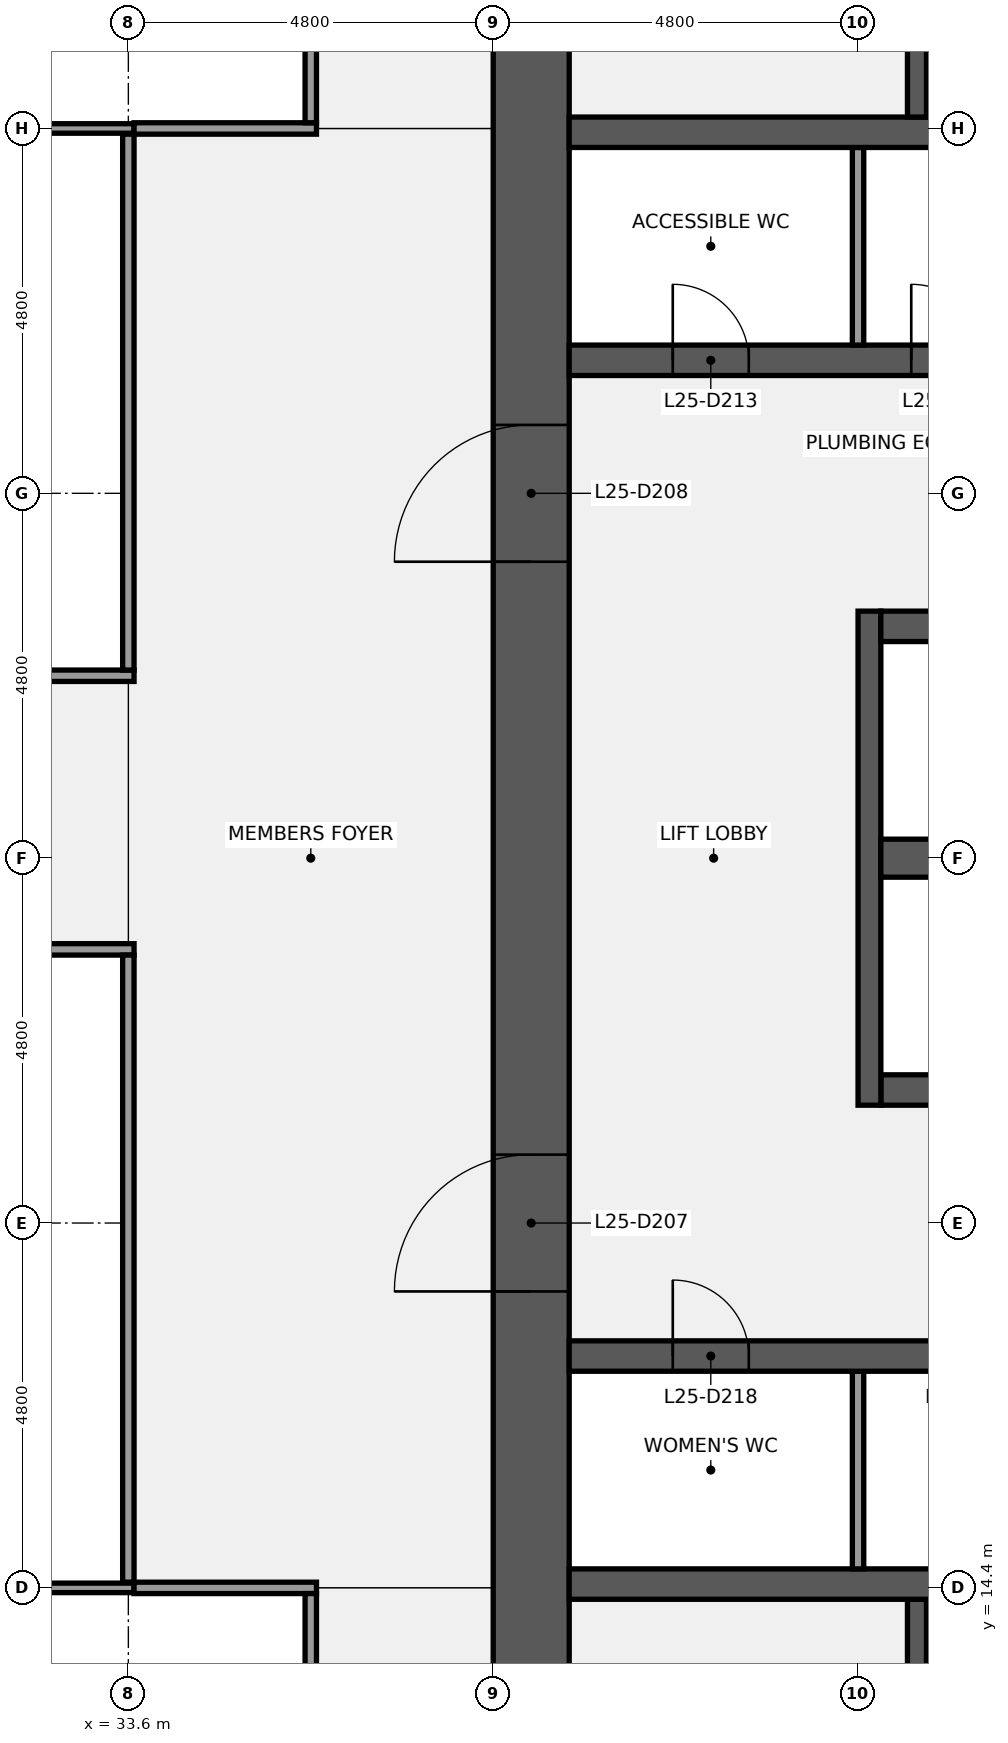
"""IFC4 building model, lengths in metres.
Left out: names, types, materials, properties, quantities, classifications, styles, units other than length and angle.
Written with IfcOpenShell. Run it as: python <this file> out.ifc"""

import sys

from ifc_helpers import new_model, si_unit, direction, frame, frame_2d, origin, place, context, subcontext, project, spatial, rectangle, extrude, element, fill, save


model = new_model("IFC4")
c1 = context("Model", 3, precision=1e-05, world=origin(), true_north=direction((0.0, 1.0)))
c2 = subcontext(c1, "Body", "Model", "MODEL_VIEW")
j1 = project(units=[si_unit("LENGTHUNIT", "METRE"), si_unit("PLANEANGLEUNIT", "RADIAN")], contexts=[c1])
p1 = place(None, origin())
s1 = spatial("IfcSite", under=j1, at=p1, CompositionType="ELEMENT")
p2 = place(p1, origin())
s2 = spatial("IfcBuilding", under=s1, at=p2, CompositionType="ELEMENT")
p3 = place(p2, frame((0.0, 0.0, 120.1)))
s3 = spatial("IfcBuildingStorey", under=s2, at=p3, CompositionType="ELEMENT", Elevation=120.1)
p4 = place(p3, frame((38.9, 9.6, 0.0), z_axis=(0.0, 0.0, 1.0), x_axis=(0.0, 1.0, 0.0)))
e1 = element("IfcWall", 1, at=p4, inside=s3, PredefinedType="SHEAR", context=c2, shape_type="SweptSolid", body=[
    extrude(rectangle(XDim=28.8, YDim=1.0, at=frame_2d((14.4, 0.0))), origin(), (0.0, 0.0, 1.0), 3.84),
])
p5 = place(p4, frame((8.7, 0.0, 0.0)))
e2 = element("IfcOpeningElement", 2, at=p5, cuts=e1, PredefinedType="OPENING", context=c2, shape_type="SweptSolid", body=[
    extrude(rectangle(XDim=1.8, YDim=2.1, at=frame_2d((0.9, 1.05))), frame((0.0, 0.51, 0.0), z_axis=(0.0, -1.0, 0.0), x_axis=(1.0, 0.0, 0.0)), (0.0, 0.0, 1.0), 1.02),
])
p6 = place(p4, frame((18.3, 0.0, 0.0)))
e3 = element("IfcOpeningElement", 3, at=p6, cuts=e1, PredefinedType="OPENING", context=c2, shape_type="SweptSolid", body=[
    extrude(rectangle(XDim=1.8, YDim=2.1, at=frame_2d((0.9, 1.05))), frame((0.0, 0.51, 0.0), z_axis=(0.0, -1.0, 0.0), x_axis=(1.0, 0.0, 0.0)), (0.0, 0.0, 1.0), 1.02),
])
p7 = place(p3, frame((43.975, 10.8, 0.0), z_axis=(0.0, 0.0, 1.0), x_axis=(0.0, 1.0, 0.0)))
e4 = element("IfcWall", 4, at=p7, inside=s3, PredefinedType="SHEAR", context=c2, shape_type="SweptSolid", body=[
    extrude(rectangle(XDim=3.45, YDim=0.25, at=frame_2d((1.725, 0.0))), origin(), (0.0, 0.0, 1.0), 3.84),
])
p8 = place(p7, frame((1.175, 0.0, 0.0)))
e5 = element("IfcOpeningElement", 5, at=p8, cuts=e4, PredefinedType="OPENING", context=c2, shape_type="SweptSolid", body=[
    extrude(rectangle(XDim=1.1, YDim=2.1, at=frame_2d((0.55, 1.05))), frame((0.0, 0.135, 0.0), z_axis=(0.0, -1.0, 0.0), x_axis=(1.0, 0.0, 0.0)), (0.0, 0.0, 1.0), 0.27),
])
p9 = place(p3, frame((39.4, 14.45, 0.0), z_axis=(0.0, 0.0, 1.0), x_axis=(1.0, 0.0, 0.0)))
e6 = element("IfcWall", 6, at=p9, inside=s3, PredefinedType="SHEAR", context=c2, shape_type="SweptSolid", body=[
    extrude(rectangle(XDim=17.2, YDim=0.4, at=frame_2d((8.6, 0.0))), origin(), (0.0, 0.0, 1.0), 3.84),
])
p10 = place(p3, frame((43.2, 14.65, 0.0), z_axis=(0.0, 0.0, 1.0), x_axis=(0.0, 1.0, 0.0)))
e7 = element("IfcWall", 7, at=p10, inside=s3, PredefinedType="PARTITIONING", context=c2, shape_type="SweptSolid", body=[
    extrude(rectangle(XDim=2.6, YDim=0.15, at=frame_2d((1.3, 0.0))), origin(), (0.0, 0.0, 1.0), 3.84),
])
p11 = place(p3, frame((39.4, 17.45, 0.0), z_axis=(0.0, 0.0, 1.0), x_axis=(1.0, 0.0, 0.0)))
e8 = element("IfcWall", 8, at=p11, inside=s3, PredefinedType="SHEAR", context=c2, shape_type="SweptSolid", body=[
    extrude(rectangle(XDim=17.2, YDim=0.4, at=frame_2d((8.6, 0.0))), origin(), (0.0, 0.0, 1.0), 3.84),
])
p12 = place(p11, frame((15.438, 0.0, 0.0)))
e9 = element("IfcOpeningElement", 9, at=p12, cuts=e8, PredefinedType="OPENING", context=c2, shape_type="SweptSolid", body=[
    extrude(rectangle(XDim=1.0, YDim=2.1, at=frame_2d((0.5, 1.05))), frame((0.0, 0.21, 0.0), z_axis=(0.0, -1.0, 0.0), x_axis=(1.0, 0.0, 0.0)), (0.0, 0.0, 1.0), 0.42),
])
p13 = place(p11, frame((11.7, 0.0, 0.0)))
e10 = element("IfcOpeningElement", 10, at=p13, cuts=e8, PredefinedType="OPENING", context=c2, shape_type="SweptSolid", body=[
    extrude(rectangle(XDim=1.0, YDim=2.1, at=frame_2d((0.5, 1.05))), frame((0.0, 0.21, 0.0), z_axis=(0.0, -1.0, 0.0), x_axis=(1.0, 0.0, 0.0)), (0.0, 0.0, 1.0), 0.42),
])
p14 = place(p11, frame((7.8, 0.0, 0.0)))
e11 = element("IfcOpeningElement", 11, at=p14, cuts=e8, PredefinedType="OPENING", context=c2, shape_type="SweptSolid", body=[
    extrude(rectangle(XDim=1.0, YDim=2.1, at=frame_2d((0.5, 1.05))), frame((0.0, 0.21, 0.0), z_axis=(0.0, -1.0, 0.0), x_axis=(1.0, 0.0, 0.0)), (0.0, 0.0, 1.0), 0.42),
])
p15 = place(p11, frame((4.8, 0.0, 0.0)))
e12 = element("IfcOpeningElement", 12, at=p15, cuts=e8, PredefinedType="OPENING", context=c2, shape_type="SweptSolid", body=[
    extrude(rectangle(XDim=1.0, YDim=2.1, at=frame_2d((0.5, 1.05))), frame((0.0, 0.21, 0.0), z_axis=(0.0, -1.0, 0.0), x_axis=(1.0, 0.0, 0.0)), (0.0, 0.0, 1.0), 0.42),
])
p16 = place(p11, frame((1.363, 0.0, 0.0)))
e13 = element("IfcOpeningElement", 13, at=p16, cuts=e8, PredefinedType="OPENING", context=c2, shape_type="SweptSolid", body=[
    extrude(rectangle(XDim=1.0, YDim=2.1, at=frame_2d((0.5, 1.05))), frame((0.0, 0.21, 0.0), z_axis=(0.0, -1.0, 0.0), x_axis=(1.0, 0.0, 0.0)), (0.0, 0.0, 1.0), 0.42),
])
p17 = place(p3, frame((43.5, 20.95, 0.0), z_axis=(0.0, 0.0, 1.0), x_axis=(1.0, 0.0, 0.0)))
e14 = element("IfcWall", 14, at=p17, inside=s3, PredefinedType="SHEAR", context=c2, shape_type="SweptSolid", body=[
    extrude(rectangle(XDim=13.1, YDim=0.4, at=frame_2d((6.55, 0.0))), origin(), (0.0, 0.0, 1.0), 3.84),
])
p18 = place(p17, frame((6.15, 0.0, 0.0)))
e15 = element("IfcOpeningElement", 15, at=p18, cuts=e14, PredefinedType="OPENING", context=c2, shape_type="SweptSolid", body=[
    extrude(rectangle(XDim=1.1, YDim=2.1, at=frame_2d((0.55, 1.05))), frame((0.0, 0.21, 0.0), z_axis=(0.0, -1.0, 0.0), x_axis=(1.0, 0.0, 0.0)), (0.0, 0.0, 1.0), 0.42),
])
p19 = place(p17, frame((1.3, 0.0, 0.0)))
e16 = element("IfcOpeningElement", 16, at=p19, cuts=e14, PredefinedType="OPENING", context=c2, shape_type="SweptSolid", body=[
    extrude(rectangle(XDim=1.0, YDim=2.1, at=frame_2d((0.5, 1.05))), frame((0.0, 0.21, 0.0), z_axis=(0.0, -1.0, 0.0), x_axis=(1.0, 0.0, 0.0)), (0.0, 0.0, 1.0), 0.42),
])
p20 = place(p3, frame((43.35, 20.75, 0.0), z_axis=(0.0, 0.0, 1.0), x_axis=(0.0, 1.0, 0.0)))
e17 = element("IfcWall", 17, at=p20, inside=s3, PredefinedType="SHEAR", context=c2, shape_type="SweptSolid", body=[
    extrude(rectangle(XDim=6.5, YDim=0.3, at=frame_2d((3.25, 0.0))), origin(), (0.0, 0.0, 1.0), 3.84),
])
p21 = place(p3, frame((43.5, 24.0, 0.0), z_axis=(0.0, 0.0, 1.0), x_axis=(1.0, 0.0, 0.0)))
e18 = element("IfcWall", 18, at=p21, inside=s3, PredefinedType="SHEAR", context=c2, shape_type="SweptSolid", body=[
    extrude(rectangle(XDim=13.1, YDim=0.5, at=frame_2d((6.55, 0.0))), origin(), (0.0, 0.0, 1.0), 3.84),
])
p22 = place(p3, frame((43.5, 27.05, 0.0), z_axis=(0.0, 0.0, 1.0), x_axis=(1.0, 0.0, 0.0)))
e19 = element("IfcWall", 19, at=p22, inside=s3, PredefinedType="SHEAR", context=c2, shape_type="SweptSolid", body=[
    extrude(rectangle(XDim=13.1, YDim=0.4, at=frame_2d((6.55, 0.0))), origin(), (0.0, 0.0, 1.0), 3.84),
])
p23 = place(p22, frame((10.7, 0.0, 0.0)))
e20 = element("IfcOpeningElement", 20, at=p23, cuts=e19, PredefinedType="OPENING", context=c2, shape_type="SweptSolid", body=[
    extrude(rectangle(XDim=1.2, YDim=2.1, at=frame_2d((0.6, 1.05))), frame((0.0, 0.21, 0.0), z_axis=(0.0, -1.0, 0.0), x_axis=(1.0, 0.0, 0.0)), (0.0, 0.0, 1.0), 0.42),
])
p24 = place(p22, frame((8.1, 0.0, 0.0)))
e21 = element("IfcOpeningElement", 21, at=p24, cuts=e19, PredefinedType="OPENING", context=c2, shape_type="SweptSolid", body=[
    extrude(rectangle(XDim=1.2, YDim=2.1, at=frame_2d((0.6, 1.05))), frame((0.0, 0.21, 0.0), z_axis=(0.0, -1.0, 0.0), x_axis=(1.0, 0.0, 0.0)), (0.0, 0.0, 1.0), 0.42),
])
p25 = place(p22, frame((5.5, 0.0, 0.0)))
e22 = element("IfcOpeningElement", 22, at=p25, cuts=e19, PredefinedType="OPENING", context=c2, shape_type="SweptSolid", body=[
    extrude(rectangle(XDim=1.2, YDim=2.1, at=frame_2d((0.6, 1.05))), frame((0.0, 0.21, 0.0), z_axis=(0.0, -1.0, 0.0), x_axis=(1.0, 0.0, 0.0)), (0.0, 0.0, 1.0), 0.42),
])
p26 = place(p22, frame((1.5, 0.0, 0.0)))
e23 = element("IfcOpeningElement", 23, at=p26, cuts=e19, PredefinedType="OPENING", context=c2, shape_type="SweptSolid", body=[
    extrude(rectangle(XDim=1.2, YDim=2.1, at=frame_2d((0.6, 1.05))), frame((0.0, 0.21, 0.0), z_axis=(0.0, -1.0, 0.0), x_axis=(1.0, 0.0, 0.0)), (0.0, 0.0, 1.0), 0.42),
])
p27 = place(p3, frame((39.4, 30.55, 0.0), z_axis=(0.0, 0.0, 1.0), x_axis=(1.0, 0.0, 0.0)))
e24 = element("IfcWall", 24, at=p27, inside=s3, PredefinedType="SHEAR", context=c2, shape_type="SweptSolid", body=[
    extrude(rectangle(XDim=17.2, YDim=0.4, at=frame_2d((8.6, 0.0))), origin(), (0.0, 0.0, 1.0), 3.84),
])
p28 = place(p27, frame((14.538, 0.0, 0.0)))
e25 = element("IfcOpeningElement", 25, at=p28, cuts=e24, PredefinedType="OPENING", context=c2, shape_type="SweptSolid", body=[
    extrude(rectangle(XDim=1.0, YDim=2.1, at=frame_2d((0.5, 1.05))), frame((0.0, 0.21, 0.0), z_axis=(0.0, -1.0, 0.0), x_axis=(1.0, 0.0, 0.0)), (0.0, 0.0, 1.0), 0.42),
])
p29 = place(p27, frame((10.5, 0.0, 0.0)))
e26 = element("IfcOpeningElement", 26, at=p29, cuts=e24, PredefinedType="OPENING", context=c2, shape_type="SweptSolid", body=[
    extrude(rectangle(XDim=1.0, YDim=2.1, at=frame_2d((0.5, 1.05))), frame((0.0, 0.21, 0.0), z_axis=(0.0, -1.0, 0.0), x_axis=(1.0, 0.0, 0.0)), (0.0, 0.0, 1.0), 0.42),
])
p30 = place(p27, frame((7.2, 0.0, 0.0)))
e27 = element("IfcOpeningElement", 27, at=p30, cuts=e24, PredefinedType="OPENING", context=c2, shape_type="SweptSolid", body=[
    extrude(rectangle(XDim=1.0, YDim=2.1, at=frame_2d((0.5, 1.05))), frame((0.0, 0.21, 0.0), z_axis=(0.0, -1.0, 0.0), x_axis=(1.0, 0.0, 0.0)), (0.0, 0.0, 1.0), 0.42),
])
p31 = place(p27, frame((4.5, 0.0, 0.0)))
e28 = element("IfcOpeningElement", 28, at=p31, cuts=e24, PredefinedType="OPENING", context=c2, shape_type="SweptSolid", body=[
    extrude(rectangle(XDim=1.0, YDim=2.1, at=frame_2d((0.5, 1.05))), frame((0.0, 0.21, 0.0), z_axis=(0.0, -1.0, 0.0), x_axis=(1.0, 0.0, 0.0)), (0.0, 0.0, 1.0), 0.42),
])
p32 = place(p27, frame((1.363, 0.0, 0.0)))
e29 = element("IfcOpeningElement", 29, at=p32, cuts=e24, PredefinedType="OPENING", context=c2, shape_type="SweptSolid", body=[
    extrude(rectangle(XDim=1.0, YDim=2.1, at=frame_2d((0.5, 1.05))), frame((0.0, 0.21, 0.0), z_axis=(0.0, -1.0, 0.0), x_axis=(1.0, 0.0, 0.0)), (0.0, 0.0, 1.0), 0.42),
])
p33 = place(p3, frame((43.2, 30.75, 0.0), z_axis=(0.0, 0.0, 1.0), x_axis=(0.0, 1.0, 0.0)))
e30 = element("IfcWall", 30, at=p33, inside=s3, PredefinedType="PARTITIONING", context=c2, shape_type="SweptSolid", body=[
    extrude(rectangle(XDim=2.6, YDim=0.15, at=frame_2d((1.3, 0.0))), origin(), (0.0, 0.0, 1.0), 3.84),
])
p34 = place(p3, frame((39.4, 33.55, 0.0), z_axis=(0.0, 0.0, 1.0), x_axis=(1.0, 0.0, 0.0)))
e31 = element("IfcWall", 31, at=p34, inside=s3, PredefinedType="SHEAR", context=c2, shape_type="SweptSolid", body=[
    extrude(rectangle(XDim=17.2, YDim=0.4, at=frame_2d((8.6, 0.0))), origin(), (0.0, 0.0, 1.0), 3.84),
])
p35 = place(p3, frame((43.975, 33.75, 0.0), z_axis=(0.0, 0.0, 1.0), x_axis=(0.0, 1.0, 0.0)))
e32 = element("IfcWall", 32, at=p35, inside=s3, PredefinedType="SHEAR", context=c2, shape_type="SweptSolid", body=[
    extrude(rectangle(XDim=3.45, YDim=0.25, at=frame_2d((1.725, 0.0))), origin(), (0.0, 0.0, 1.0), 3.84),
])
p36 = place(p35, frame((1.175, 0.0, 0.0)))
e33 = element("IfcOpeningElement", 33, at=p36, cuts=e32, PredefinedType="OPENING", context=c2, shape_type="SweptSolid", body=[
    extrude(rectangle(XDim=1.1, YDim=2.1, at=frame_2d((0.55, 1.05))), frame((0.0, 0.135, 0.0), z_axis=(0.0, -1.0, 0.0), x_axis=(1.0, 0.0, 0.0)), (0.0, 0.0, 1.0), 0.27),
])
p37 = place(p3, frame((24.075, 14.4, 0.0), z_axis=(0.0, 0.0, 1.0), x_axis=(1.0, 0.0, 0.0)))
e34 = element("IfcWall", 34, at=p37, inside=s3, PredefinedType="PARTITIONING", context=c2, shape_type="SweptSolid", body=[
    extrude(rectangle(XDim=9.6, YDim=0.125, at=frame_2d((4.8, 0.0))), origin(), (0.0, 0.0, 1.0), 2.936),
])
p38 = place(p3, frame((33.675, 14.4, 0.0), z_axis=(0.0, 0.0, 1.0), x_axis=(1.0, 0.0, 0.0)))
e35 = element("IfcWall", 35, at=p38, inside=s3, PredefinedType="PARTITIONING", context=c2, shape_type="SweptSolid", body=[
    extrude(rectangle(XDim=2.4, YDim=0.15, at=frame_2d((1.2, 0.0))), origin(), (0.0, 0.0, 1.0), 2.936),
])
p39 = place(p3, frame((23.925, 22.8, 0.0), z_axis=(0.0, 0.0, 1.0), x_axis=(1.0, 0.0, 0.0)))
e36 = element("IfcWall", 36, at=p39, inside=s3, PredefinedType="PARTITIONING", context=c2, shape_type="SweptSolid", body=[
    extrude(rectangle(XDim=9.75, YDim=0.15, at=frame_2d((4.875, 0.0))), origin(), (0.0, 0.0, 1.0), 2.936),
])
p40 = place(p39, frame((4.375, 0.0, 0.0)))
e37 = element("IfcOpeningElement", 37, at=p40, cuts=e36, PredefinedType="OPENING", context=c2, shape_type="SweptSolid", body=[
    extrude(rectangle(XDim=1.0, YDim=2.1, at=frame_2d((0.5, 1.05))), frame((0.0, 0.085, 0.0), z_axis=(0.0, -1.0, 0.0), x_axis=(1.0, 0.0, 0.0)), (0.0, 0.0, 1.0), 0.17),
])
p41 = place(p3, frame((23.925, 26.4, 0.0), z_axis=(0.0, 0.0, 1.0), x_axis=(1.0, 0.0, 0.0)))
e38 = element("IfcWall", 38, at=p41, inside=s3, PredefinedType="PARTITIONING", context=c2, shape_type="SweptSolid", body=[
    extrude(rectangle(XDim=9.75, YDim=0.15, at=frame_2d((4.875, 0.0))), origin(), (0.0, 0.0, 1.0), 2.936),
])
p42 = place(p41, frame((4.375, 0.0, 0.0)))
e39 = element("IfcOpeningElement", 39, at=p42, cuts=e38, PredefinedType="OPENING", context=c2, shape_type="SweptSolid", body=[
    extrude(rectangle(XDim=1.0, YDim=2.1, at=frame_2d((0.5, 1.05))), frame((0.0, 0.085, 0.0), z_axis=(0.0, -1.0, 0.0), x_axis=(1.0, 0.0, 0.0)), (0.0, 0.0, 1.0), 0.17),
])
p43 = place(p3, frame((24.075, 33.6, 0.0), z_axis=(0.0, 0.0, 1.0), x_axis=(1.0, 0.0, 0.0)))
e40 = element("IfcWall", 40, at=p43, inside=s3, PredefinedType="PARTITIONING", context=c2, shape_type="SweptSolid", body=[
    extrude(rectangle(XDim=9.6, YDim=0.125, at=frame_2d((4.8, 0.0))), origin(), (0.0, 0.0, 1.0), 2.936),
])
p44 = place(p3, frame((33.675, 33.6, 0.0), z_axis=(0.0, 0.0, 1.0), x_axis=(1.0, 0.0, 0.0)))
e41 = element("IfcWall", 41, at=p44, inside=s3, PredefinedType="PARTITIONING", context=c2, shape_type="SweptSolid", body=[
    extrude(rectangle(XDim=2.4, YDim=0.15, at=frame_2d((1.2, 0.0))), origin(), (0.0, 0.0, 1.0), 2.936),
])
p45 = place(p3, frame((33.6, 14.475, 0.0), z_axis=(0.0, 0.0, 1.0), x_axis=(0.0, 1.0, 0.0)))
e42 = element("IfcWall", 42, at=p45, inside=s3, PredefinedType="PARTITIONING", context=c2, shape_type="SweptSolid", body=[
    extrude(rectangle(XDim=8.25, YDim=0.15, at=frame_2d((4.125, 0.0))), origin(), (0.0, 0.0, 1.0), 2.936),
])
p46 = place(p3, frame((33.6, 26.475, 0.0), z_axis=(0.0, 0.0, 1.0), x_axis=(0.0, 1.0, 0.0)))
e43 = element("IfcWall", 43, at=p46, inside=s3, PredefinedType="PARTITIONING", context=c2, shape_type="SweptSolid", body=[
    extrude(rectangle(XDim=7.05, YDim=0.15, at=frame_2d((3.525, 0.0))), origin(), (0.0, 0.0, 1.0), 2.936),
])
for number, where, z_axis, x_axis in (
    (44, (36.0, 9.675, 0.0), (0.0, 0.0, 1.0), (0.0, 1.0, 0.0)),
    (45, (36.0, 33.675, 0.0), (0.0, 0.0, 1.0), (0.0, 1.0, 0.0)),
):
    element("IfcWall", number, at=place(p3, frame(where, z_axis=z_axis, x_axis=x_axis)), inside=s3, PredefinedType="PARTITIONING", context=c2, shape_type="SweptSolid", body=[
        extrude(rectangle(XDim=4.65, YDim=0.15, at=frame_2d((2.325, 0.0))), origin(), (0.0, 0.0, 1.0), 2.936),
    ])
p47 = place(p5, origin())
e46 = element("IfcDoor", 46, at=p47, inside=s3, OperationType="DOUBLE_DOOR_SINGLE_SWING", PredefinedType="DOOR", context=c2, shape_type="SweptSolid", body=[
    extrude(rectangle(XDim=1.8, YDim=2.1, at=frame_2d((0.9, 1.05))), frame((0.0, 0.025, 0.0), z_axis=(0.0, -1.0, 0.0), x_axis=(1.0, 0.0, 0.0)), (0.0, 0.0, 1.0), 0.05),
])
fill(e2, e46)
p48 = place(p6, origin())
e47 = element("IfcDoor", 47, at=p48, inside=s3, OperationType="DOUBLE_DOOR_SINGLE_SWING", PredefinedType="DOOR", context=c2, shape_type="SweptSolid", body=[
    extrude(rectangle(XDim=1.8, YDim=2.1, at=frame_2d((0.9, 1.05))), frame((0.0, 0.025, 0.0), z_axis=(0.0, -1.0, 0.0), x_axis=(1.0, 0.0, 0.0)), (0.0, 0.0, 1.0), 0.05),
])
fill(e3, e47)
p49 = place(p31, origin())
e48 = element("IfcDoor", 48, at=p49, inside=s3, OperationType="SINGLE_SWING_LEFT", PredefinedType="DOOR", context=c2, shape_type="SweptSolid", body=[
    extrude(rectangle(XDim=1.0, YDim=2.1, at=frame_2d((0.5, 1.05))), frame((0.0, 0.025, 0.0), z_axis=(0.0, -1.0, 0.0), x_axis=(1.0, 0.0, 0.0)), (0.0, 0.0, 1.0), 0.05),
])
fill(e28, e48)
p50 = place(p32, origin())
e49 = element("IfcDoor", 49, at=p50, inside=s3, OperationType="SINGLE_SWING_LEFT", PredefinedType="DOOR", context=c2, shape_type="SweptSolid", body=[
    extrude(rectangle(XDim=1.0, YDim=2.1, at=frame_2d((0.5, 1.05))), frame((0.0, 0.025, 0.0), z_axis=(0.0, -1.0, 0.0), x_axis=(1.0, 0.0, 0.0)), (0.0, 0.0, 1.0), 0.05),
])
fill(e29, e49)
p51 = place(p16, origin())
e50 = element("IfcDoor", 50, at=p51, inside=s3, OperationType="SINGLE_SWING_LEFT", PredefinedType="DOOR", context=c2, shape_type="SweptSolid", body=[
    extrude(rectangle(XDim=1.0, YDim=2.1, at=frame_2d((0.5, 1.05))), frame((0.0, 0.025, 0.0), z_axis=(0.0, -1.0, 0.0), x_axis=(1.0, 0.0, 0.0)), (0.0, 0.0, 1.0), 0.05),
])
fill(e13, e50)
save(model, sys.argv[1])
